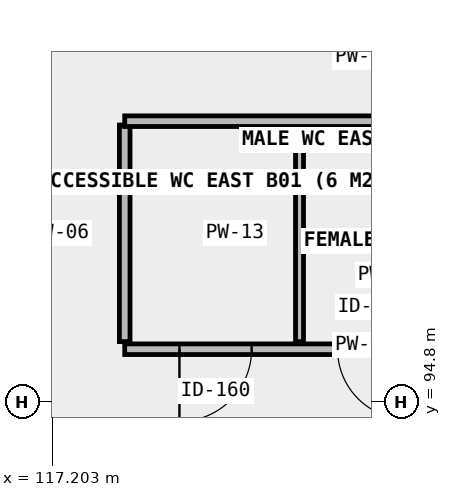
"""IFC4 building model, lengths in metres.
Left out: names, types, materials, properties, quantities, classifications, styles, units other than length and angle.
Written with IfcOpenShell. Run it as: python <this file> out.ifc"""

import sys

from ifc_helpers import new_model, si_unit, direction, frame, frame_2d, origin, place, context, subcontext, project, spatial, rectangle, extrude, element, fill, save


model = new_model("IFC4")
c1 = context("Model", 3, precision=1e-05, world=origin(), true_north=direction((0.0, 1.0)))
c2 = subcontext(c1, "Body", "Model", "MODEL_VIEW")
j1 = project(units=[si_unit("LENGTHUNIT", "METRE"), si_unit("PLANEANGLEUNIT", "RADIAN")], contexts=[c1])
p1 = place(None, origin())
s1 = spatial("IfcSite", under=j1, at=p1, CompositionType="ELEMENT")
p2 = place(p1, origin())
s2 = spatial("IfcBuilding", under=s1, at=p2, CompositionType="ELEMENT")
p3 = place(p2, frame((0.0, 0.0, -4.2)))
s3 = spatial("IfcBuildingStorey", under=s2, at=p3, CompositionType="ELEMENT", Elevation=-4.2)
p4 = place(p3, frame((118.15, 95.5, 0.0), z_axis=(0.0, 0.0, 1.0), x_axis=(1.0, 0.0, 0.0)))
e1 = element("IfcWall", 1, at=p4, inside=s3, PredefinedType="PLUMBINGWALL", context=c2, shape_type="SweptSolid", body=[
    extrude(rectangle(XDim=6.3, YDim=0.14, at=frame_2d((3.15, 0.0))), origin(), (0.0, 0.0, 1.0), 3.86),
])
p5 = place(p4, frame((0.72, 0.0, 0.0)))
e2 = element("IfcOpeningElement", 2, at=p5, cuts=e1, PredefinedType="OPENING", context=c2, shape_type="SweptSolid", body=[
    extrude(rectangle(XDim=0.95, YDim=2.1, at=frame_2d((0.475, 1.05))), frame((0.0, 0.08, 0.0), z_axis=(0.0, -1.0, 0.0), x_axis=(1.0, 0.0, 0.0)), (0.0, 0.0, 1.0), 0.16),
])
p6 = place(p4, frame((2.8, 0.0, 0.0)))
e3 = element("IfcOpeningElement", 3, at=p6, cuts=e1, PredefinedType="OPENING", context=c2, shape_type="SweptSolid", body=[
    extrude(rectangle(XDim=0.92, YDim=2.1, at=frame_2d((0.46, 1.05))), frame((0.0, 0.08, 0.0), z_axis=(0.0, -1.0, 0.0), x_axis=(1.0, 0.0, 0.0)), (0.0, 0.0, 1.0), 0.16),
])
p7 = place(p4, frame((4.8, 0.0, 0.0)))
e4 = element("IfcOpeningElement", 4, at=p7, cuts=e1, PredefinedType="OPENING", context=c2, shape_type="SweptSolid", body=[
    extrude(rectangle(XDim=0.92, YDim=2.1, at=frame_2d((0.46, 1.05))), frame((0.0, 0.08, 0.0), z_axis=(0.0, -1.0, 0.0), x_axis=(1.0, 0.0, 0.0)), (0.0, 0.0, 1.0), 0.16),
])
p8 = place(p3, frame((118.15, 95.6, 0.0), z_axis=(0.0, 0.0, 1.0), x_axis=(0.0, 1.0, 0.0)))
e5 = element("IfcWall", 5, at=p8, inside=s3, PredefinedType="PLUMBINGWALL", context=c2, shape_type="SweptSolid", body=[
    extrude(rectangle(XDim=2.85, YDim=0.14, at=frame_2d((1.425, 0.0))), origin(), (0.0, 0.0, 1.0), 3.86),
])
p9 = place(p3, frame((120.45, 95.6, 0.0), z_axis=(0.0, 0.0, 1.0), x_axis=(0.0, 1.0, 0.0)))
e6 = element("IfcWall", 6, at=p9, inside=s3, PredefinedType="PARTITIONING", context=c2, shape_type="SweptSolid", body=[
    extrude(rectangle(XDim=2.85, YDim=0.105, at=frame_2d((1.425, 0.0))), origin(), (0.0, 0.0, 1.0), 3.86),
])
p10 = place(p3, frame((118.15, 98.5, 0.0), z_axis=(0.0, 0.0, 1.0), x_axis=(1.0, 0.0, 0.0)))
e7 = element("IfcWall", 7, at=p10, inside=s3, PredefinedType="PLUMBINGWALL", context=c2, shape_type="SweptSolid", body=[
    extrude(rectangle(XDim=6.3, YDim=0.14, at=frame_2d((3.15, 0.0))), origin(), (0.0, 0.0, 1.0), 3.86),
])
p11 = place(p5, frame((0.475, 0.0, 0.0), z_axis=(0.0, 0.0, 1.0), x_axis=(-1.0, 0.0, 0.0)))
e8 = element("IfcDoor", 8, at=p11, inside=s3, OperationType="SINGLE_SWING_LEFT", PredefinedType="DOOR", context=c2, shape_type="SweptSolid", body=[
    extrude(rectangle(XDim=0.95, YDim=2.1, at=frame_2d((0.0, 1.05))), frame((0.0, 0.025, 0.0), z_axis=(0.0, -1.0, 0.0), x_axis=(1.0, 0.0, 0.0)), (0.0, 0.0, 1.0), 0.05),
])
fill(e2, e8)
p12 = place(p6, origin())
e9 = element("IfcDoor", 9, at=p12, inside=s3, OperationType="SINGLE_SWING_RIGHT", PredefinedType="DOOR", context=c2, shape_type="SweptSolid", body=[
    extrude(rectangle(XDim=0.92, YDim=2.1, at=frame_2d((0.46, 1.05))), frame((0.0, 0.025, 0.0), z_axis=(0.0, -1.0, 0.0), x_axis=(1.0, 0.0, 0.0)), (0.0, 0.0, 1.0), 0.05),
])
fill(e3, e9)
save(model, sys.argv[1])
